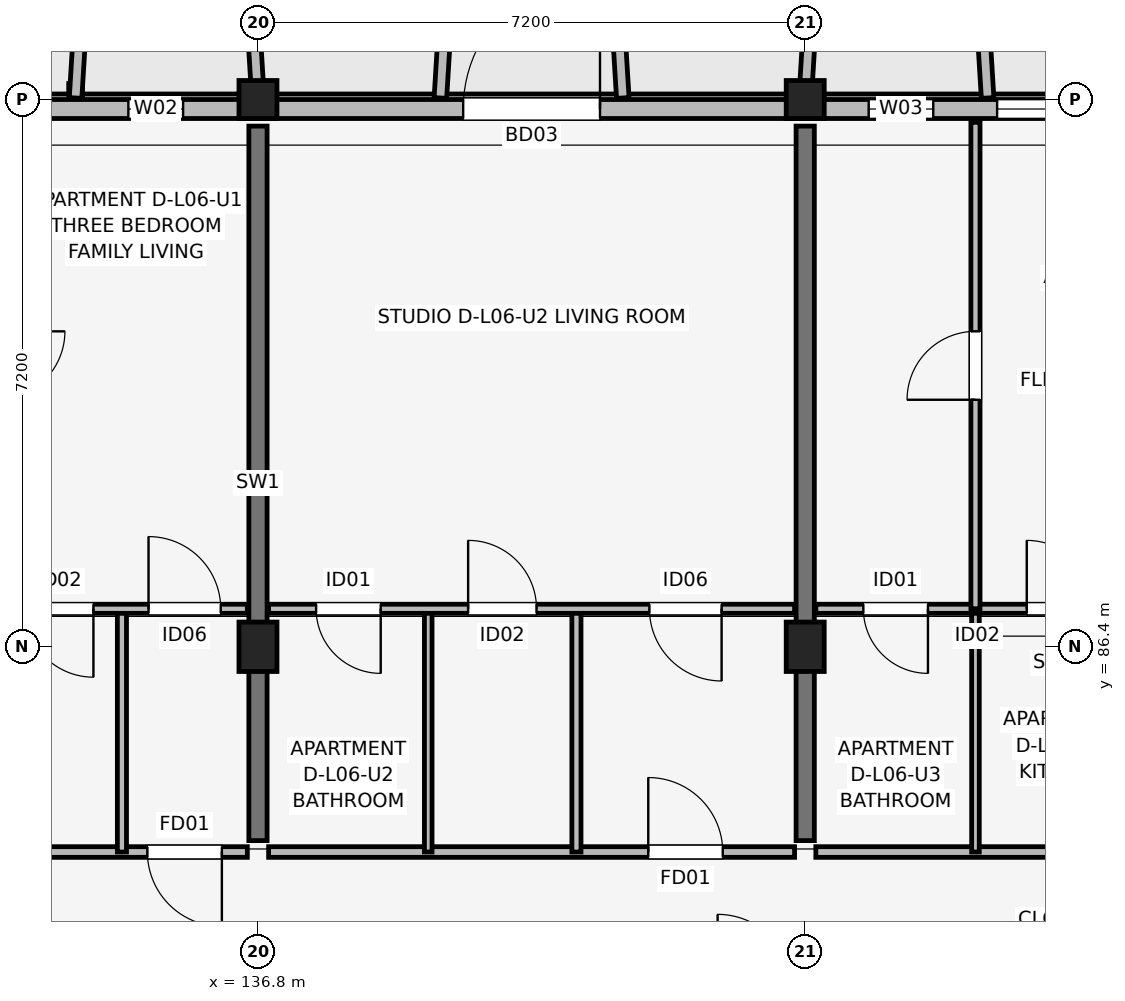
"""IFC4 building model, lengths in metres.
Left out: names, types, materials, properties, quantities, classifications, styles, units other than length and angle.
Written with IfcOpenShell. Run it as: python <this file> out.ifc"""

import sys

from ifc_helpers import new_model, si_unit, direction, frame, frame_2d, origin, origin_2d, place, context, subcontext, project, spatial, rectangle, extrude, element, fill, save


model = new_model("IFC4")
c1 = context("Model", 3, precision=1e-05, world=origin(), true_north=direction((0.0, 1.0)))
c2 = subcontext(c1, "Body", "Model", "MODEL_VIEW")
j1 = project(units=[si_unit("LENGTHUNIT", "METRE"), si_unit("PLANEANGLEUNIT", "RADIAN")], contexts=[c1])
p1 = place(None, origin())
s1 = spatial("IfcSite", under=j1, at=p1, CompositionType="ELEMENT")
p2 = place(p1, origin())
s2 = spatial("IfcBuilding", under=s1, at=p2, CompositionType="ELEMENT")
p3 = place(p2, frame((0.0, 0.0, 21.3)))
s3 = spatial("IfcBuildingStorey", under=s2, at=p3, CompositionType="ELEMENT", Elevation=21.3)
p4 = place(p3, frame((136.8, 86.4, 0.0), z_axis=(0.0, 0.0, 1.0), x_axis=(1.0, 0.0, 0.0)))
e1 = element("IfcColumn", 1, at=p4, inside=s3, PredefinedType="COLUMN", context=c2, shape_type="SweptSolid", body=[
    extrude(rectangle(XDim=0.5, YDim=0.65, at=origin_2d()), origin(), (0.0, 0.0, 1.0), 3.15),
])
p5 = place(p3, frame((136.8, 93.6, 0.0), z_axis=(0.0, 0.0, 1.0), x_axis=(1.0, 0.0, 0.0)))
e2 = element("IfcColumn", 2, at=p5, inside=s3, PredefinedType="COLUMN", context=c2, shape_type="SweptSolid", body=[
    extrude(rectangle(XDim=0.5, YDim=0.5, at=origin_2d()), origin(), (0.0, 0.0, 1.0), 3.15),
])
p6 = place(p3, frame((144.0, 86.4, 0.0), z_axis=(0.0, 0.0, 1.0), x_axis=(1.0, 0.0, 0.0)))
e3 = element("IfcColumn", 3, at=p6, inside=s3, PredefinedType="COLUMN", context=c2, shape_type="SweptSolid", body=[
    extrude(rectangle(XDim=0.5, YDim=0.65, at=origin_2d()), origin(), (0.0, 0.0, 1.0), 3.15),
])
p7 = place(p3, frame((144.0, 93.6, 0.0), z_axis=(0.0, 0.0, 1.0), x_axis=(1.0, 0.0, 0.0)))
e4 = element("IfcColumn", 4, at=p7, inside=s3, PredefinedType="COLUMN", context=c2, shape_type="SweptSolid", body=[
    extrude(rectangle(XDim=0.5, YDim=0.5, at=origin_2d()), origin(), (0.0, 0.0, 1.0), 3.15),
])
for number, where, z_axis, x_axis in (
    (5, (136.8, 83.85, 0.0), (0.0, 0.0, 1.0), (0.0, 1.0, 0.0)),
    (6, (144.0, 83.85, 0.0), (0.0, 0.0, 1.0), (0.0, 1.0, 0.0)),
):
    element("IfcWall", number, at=place(p3, frame(where, z_axis=z_axis, x_axis=x_axis)), inside=s3, PredefinedType="SHEAR", context=c2, shape_type="SweptSolid", body=[
        extrude(rectangle(XDim=9.4, YDim=0.24, at=frame_2d((4.7, 0.0))), origin(), (0.0, 0.0, 1.0), 3.15),
    ])
p8 = place(p3, frame((162.8, 93.475, 0.0), z_axis=(0.0, 0.0, 1.0), x_axis=(-1.0, 0.0, 0.0)))
e7 = element("IfcWall", 7, at=p8, inside=s3, PredefinedType="SOLIDWALL", context=c2, shape_type="SweptSolid", body=[
    extrude(rectangle(XDim=30.4, YDim=0.25, at=frame_2d((15.2, 0.0))), origin(), (0.0, 0.0, 1.0), 2.43),
])
p9 = place(p8, frame((23.3, 0.0, 0.0), z_axis=(0.0, 0.0, 1.0), x_axis=(-1.0, 0.0, 0.0)))
e8 = element("IfcOpeningElement", 8, at=p9, cuts=e7, PredefinedType="OPENING", context=c2, shape_type="SweptSolid", body=[
    extrude(rectangle(XDim=1.8, YDim=2.15, at=frame_2d((0.9, 1.075))), frame((0.0, 0.135, 0.0), z_axis=(0.0, -1.0, 0.0), x_axis=(1.0, 0.0, 0.0)), (0.0, 0.0, 1.0), 0.27),
])
p10 = place(p8, frame((8.825, 0.0, 0.0), z_axis=(0.0, 0.0, 1.0), x_axis=(-1.0, 0.0, 0.0)))
e9 = element("IfcOpeningElement", 9, at=p10, cuts=e7, PredefinedType="OPENING", context=c2, shape_type="SweptSolid", body=[
    extrude(rectangle(XDim=1.65, YDim=2.15, at=frame_2d((0.825, 1.075))), frame((0.0, 0.135, 0.0), z_axis=(0.0, -1.0, 0.0), x_axis=(1.0, 0.0, 0.0)), (0.0, 0.0, 1.0), 0.27),
])
p11 = place(p8, frame((26.985, 0.0, 0.75)))
e10 = element("IfcOpeningElement", 10, at=p11, cuts=e7, PredefinedType="OPENING", context=c2, shape_type="SweptSolid", body=[
    extrude(rectangle(XDim=0.72, YDim=1.35, at=frame_2d((0.36, 0.675))), frame((0.0, 0.135, 0.0), z_axis=(0.0, -1.0, 0.0), x_axis=(1.0, 0.0, 0.0)), (0.0, 0.0, 1.0), 0.27),
])
p12 = place(p8, frame((17.115, 0.0, 0.75)))
e11 = element("IfcOpeningElement", 11, at=p12, cuts=e7, PredefinedType="OPENING", context=c2, shape_type="SweptSolid", body=[
    extrude(rectangle(XDim=0.85, YDim=1.4, at=frame_2d((0.425, 0.7))), frame((0.0, 0.135, 0.0), z_axis=(0.0, -1.0, 0.0), x_axis=(1.0, 0.0, 0.0)), (0.0, 0.0, 1.0), 0.27),
])
p13 = place(p8, frame((14.125, 0.0, 0.67)))
e12 = element("IfcOpeningElement", 12, at=p13, cuts=e7, PredefinedType="OPENING", context=c2, shape_type="SweptSolid", body=[
    extrude(rectangle(XDim=2.15, YDim=1.65, at=frame_2d((1.075, 0.825))), frame((0.0, 0.135, 0.0), z_axis=(0.0, -1.0, 0.0), x_axis=(1.0, 0.0, 0.0)), (0.0, 0.0, 1.0), 0.27),
])
p14 = place(p8, frame((2.125, 0.0, 0.7)))
e13 = element("IfcOpeningElement", 13, at=p14, cuts=e7, PredefinedType="OPENING", context=c2, shape_type="SweptSolid", body=[
    extrude(rectangle(XDim=1.86, YDim=1.6, at=frame_2d((0.93, 0.8))), frame((0.0, 0.135, 0.0), z_axis=(0.0, -1.0, 0.0), x_axis=(1.0, 0.0, 0.0)), (0.0, 0.0, 1.0), 0.27),
])
for number, where, z_axis, x_axis in (
    (14, (134.4, 93.62, 0.0), (0.0, 0.0, 1.0), (0.061, 0.998, 0.0)),
    (15, (136.8, 93.62, 0.0), (0.0, 0.0, 1.0), (-0.061, 0.998, 0.0)),
):
    element("IfcWall", number, at=place(p3, frame(where, z_axis=z_axis, x_axis=x_axis)), inside=s3, PredefinedType="ELEMENTEDWALL", context=c2, shape_type="SweptSolid", body=[
        extrude(rectangle(XDim=1.964, YDim=0.165, at=frame_2d((0.982, 0.0))), origin(), (0.0, 0.0, 1.0), 2.95),
    ])
for number, where, z_axis, x_axis in (
    (16, (139.2, 93.62, 0.0), (0.0, 0.0, 1.0), (0.061, 0.998, 0.0)),
    (17, (141.6, 93.62, 0.0), (0.0, 0.0, 1.0), (-0.061, 0.998, 0.0)),
):
    element("IfcWall", number, at=place(p3, frame(where, z_axis=z_axis, x_axis=x_axis)), inside=s3, PredefinedType="ELEMENTEDWALL", context=c2, shape_type="SweptSolid", body=[
        extrude(rectangle(XDim=1.964, YDim=0.165, at=frame_2d((0.982, 0.0))), origin(), (0.0, 0.0, 1.0), 2.58),
    ])
p15 = place(p3, frame((144.0, 93.62, 0.0), z_axis=(0.0, 0.0, 1.0), x_axis=(0.061170732449, 0.998127317276, 0.0)))
e18 = element("IfcWall", 18, at=p15, inside=s3, PredefinedType="ELEMENTEDWALL", context=c2, shape_type="SweptSolid", body=[
    extrude(rectangle(XDim=1.964, YDim=0.165, at=frame_2d((0.982, 0.0))), origin(), (0.0, 0.0, 1.0), 2.95),
])
p16 = place(p3, frame((146.4, 93.62, 0.0), z_axis=(0.0, 0.0, 1.0), x_axis=(-0.061046865508, 0.998134900808, 0.0)))
e19 = element("IfcWall", 19, at=p16, inside=s3, PredefinedType="ELEMENTEDWALL", context=c2, shape_type="SweptSolid", body=[
    extrude(rectangle(XDim=1.964, YDim=0.165, at=frame_2d((0.982, 0.0))), origin(), (0.0, 0.0, 1.0), 2.53),
])
p17 = place(p3, frame((129.74, 83.7, 0.0), z_axis=(0.0, 0.0, 1.0), x_axis=(1.0, 0.0, 0.0)))
e20 = element("IfcWall", 20, at=p17, inside=s3, PredefinedType="PARTITIONING", context=c2, shape_type="SweptSolid", body=[
    extrude(rectangle(XDim=6.92, YDim=0.14, at=frame_2d((3.46, 0.0))), origin(), (0.0, 0.0, 1.0), 2.38),
])
p18 = place(p17, frame((6.585, 0.0, 0.0), z_axis=(0.0, 0.0, 1.0), x_axis=(-1.0, 0.0, 0.0)))
e21 = element("IfcOpeningElement", 21, at=p18, cuts=e20, PredefinedType="OPENING", context=c2, shape_type="SweptSolid", body=[
    extrude(rectangle(XDim=0.98, YDim=2.1, at=frame_2d((0.49, 1.05))), frame((0.0, 0.08, 0.0), z_axis=(0.0, -1.0, 0.0), x_axis=(1.0, 0.0, 0.0)), (0.0, 0.0, 1.0), 0.16),
])
p19 = place(p3, frame((135.01, 83.7, 0.0), z_axis=(0.0, 0.0, 1.0), x_axis=(0.0, 1.0, 0.0)))
e22 = element("IfcWall", 22, at=p19, inside=s3, PredefinedType="PARTITIONING", context=c2, shape_type="SweptSolid", body=[
    extrude(rectangle(XDim=3.2, YDim=0.12, at=frame_2d((1.6, 0.0))), origin(), (0.0, 0.0, 1.0), 2.38),
])
p20 = place(p3, frame((129.74, 86.9, 0.0), z_axis=(0.0, 0.0, 1.0), x_axis=(1.0, 0.0, 0.0)))
e23 = element("IfcWall", 23, at=p20, inside=s3, PredefinedType="PARTITIONING", context=c2, shape_type="SweptSolid", body=[
    extrude(rectangle(XDim=6.92, YDim=0.12, at=frame_2d((3.46, 0.0))), origin(), (0.0, 0.0, 1.0), 2.38),
])
p21 = place(p20, frame((2.24, 0.0, 0.0)))
e24 = element("IfcOpeningElement", 24, at=p21, cuts=e23, PredefinedType="OPENING", context=c2, shape_type="SweptSolid", body=[
    extrude(rectangle(XDim=0.85, YDim=2.08, at=frame_2d((0.425, 1.04))), frame((0.0, 0.07, 0.0), z_axis=(0.0, -1.0, 0.0), x_axis=(1.0, 0.0, 0.0)), (0.0, 0.0, 1.0), 0.14),
])
p22 = place(p20, frame((4.895, 0.0, 0.0), z_axis=(0.0, 0.0, 1.0), x_axis=(-1.0, 0.0, 0.0)))
e25 = element("IfcOpeningElement", 25, at=p22, cuts=e23, PredefinedType="OPENING", context=c2, shape_type="SweptSolid", body=[
    extrude(rectangle(XDim=0.9, YDim=2.08, at=frame_2d((0.45, 1.04))), frame((0.0, 0.07, 0.0), z_axis=(0.0, -1.0, 0.0), x_axis=(1.0, 0.0, 0.0)), (0.0, 0.0, 1.0), 0.14),
])
p23 = place(p20, frame((5.62, 0.0, 0.0)))
e26 = element("IfcOpeningElement", 26, at=p23, cuts=e23, PredefinedType="OPENING", context=c2, shape_type="SweptSolid", body=[
    extrude(rectangle(XDim=0.95, YDim=2.08, at=frame_2d((0.475, 1.04))), frame((0.0, 0.07, 0.0), z_axis=(0.0, -1.0, 0.0), x_axis=(1.0, 0.0, 0.0)), (0.0, 0.0, 1.0), 0.14),
])
p24 = place(p3, frame((136.94, 83.7, 0.0), z_axis=(0.0, 0.0, 1.0), x_axis=(1.0, 0.0, 0.0)))
e27 = element("IfcWall", 27, at=p24, inside=s3, PredefinedType="PARTITIONING", context=c2, shape_type="SweptSolid", body=[
    extrude(rectangle(XDim=6.92, YDim=0.14, at=frame_2d((3.46, 0.0))), origin(), (0.0, 0.0, 1.0), 2.38),
])
p25 = place(p24, frame((4.995, 0.0, 0.0)))
e28 = element("IfcOpeningElement", 28, at=p25, cuts=e27, PredefinedType="OPENING", context=c2, shape_type="SweptSolid", body=[
    extrude(rectangle(XDim=0.98, YDim=2.1, at=frame_2d((0.49, 1.05))), frame((0.0, 0.08, 0.0), z_axis=(0.0, -1.0, 0.0), x_axis=(1.0, 0.0, 0.0)), (0.0, 0.0, 1.0), 0.16),
])
p26 = place(p3, frame((139.04, 83.7, 0.0), z_axis=(0.0, 0.0, 1.0), x_axis=(0.0, 1.0, 0.0)))
e29 = element("IfcWall", 29, at=p26, inside=s3, PredefinedType="PARTITIONING", context=c2, shape_type="SweptSolid", body=[
    extrude(rectangle(XDim=3.2, YDim=0.1, at=frame_2d((1.6, 0.0))), origin(), (0.0, 0.0, 1.0), 2.38),
])
p27 = place(p3, frame((140.99, 83.7, 0.0), z_axis=(0.0, 0.0, 1.0), x_axis=(0.0, 1.0, 0.0)))
e30 = element("IfcWall", 30, at=p27, inside=s3, PredefinedType="PARTITIONING", context=c2, shape_type="SweptSolid", body=[
    extrude(rectangle(XDim=3.2, YDim=0.12, at=frame_2d((1.6, 0.0))), origin(), (0.0, 0.0, 1.0), 2.38),
])
p28 = place(p3, frame((136.94, 86.9, 0.0), z_axis=(0.0, 0.0, 1.0), x_axis=(1.0, 0.0, 0.0)))
e31 = element("IfcWall", 31, at=p28, inside=s3, PredefinedType="PARTITIONING", context=c2, shape_type="SweptSolid", body=[
    extrude(rectangle(XDim=6.92, YDim=0.12, at=frame_2d((3.46, 0.0))), origin(), (0.0, 0.0, 1.0), 2.38),
])
p29 = place(p28, frame((1.475, 0.0, 0.0), z_axis=(0.0, 0.0, 1.0), x_axis=(-1.0, 0.0, 0.0)))
e32 = element("IfcOpeningElement", 32, at=p29, cuts=e31, PredefinedType="OPENING", context=c2, shape_type="SweptSolid", body=[
    extrude(rectangle(XDim=0.85, YDim=2.08, at=frame_2d((0.425, 1.04))), frame((0.0, 0.07, 0.0), z_axis=(0.0, -1.0, 0.0), x_axis=(1.0, 0.0, 0.0)), (0.0, 0.0, 1.0), 0.14),
])
p30 = place(p28, frame((2.625, 0.0, 0.0)))
e33 = element("IfcOpeningElement", 33, at=p30, cuts=e31, PredefinedType="OPENING", context=c2, shape_type="SweptSolid", body=[
    extrude(rectangle(XDim=0.9, YDim=2.08, at=frame_2d((0.45, 1.04))), frame((0.0, 0.07, 0.0), z_axis=(0.0, -1.0, 0.0), x_axis=(1.0, 0.0, 0.0)), (0.0, 0.0, 1.0), 0.14),
])
p31 = place(p28, frame((5.96, 0.0, 0.0), z_axis=(0.0, 0.0, 1.0), x_axis=(-1.0, 0.0, 0.0)))
e34 = element("IfcOpeningElement", 34, at=p31, cuts=e31, PredefinedType="OPENING", context=c2, shape_type="SweptSolid", body=[
    extrude(rectangle(XDim=0.95, YDim=2.08, at=frame_2d((0.475, 1.04))), frame((0.0, 0.07, 0.0), z_axis=(0.0, -1.0, 0.0), x_axis=(1.0, 0.0, 0.0)), (0.0, 0.0, 1.0), 0.14),
])
p32 = place(p3, frame((144.14, 83.7, 0.0), z_axis=(0.0, 0.0, 1.0), x_axis=(1.0, 0.0, 0.0)))
e35 = element("IfcWall", 35, at=p32, inside=s3, PredefinedType="PARTITIONING", context=c2, shape_type="SweptSolid", body=[
    extrude(rectangle(XDim=6.92, YDim=0.14, at=frame_2d((3.46, 0.0))), origin(), (0.0, 0.0, 1.0), 2.38),
])
p33 = place(p32, frame((5.145, 0.0, 0.0)))
e36 = element("IfcOpeningElement", 36, at=p33, cuts=e35, PredefinedType="OPENING", context=c2, shape_type="SweptSolid", body=[
    extrude(rectangle(XDim=0.98, YDim=2.1, at=frame_2d((0.49, 1.05))), frame((0.0, 0.08, 0.0), z_axis=(0.0, -1.0, 0.0), x_axis=(1.0, 0.0, 0.0)), (0.0, 0.0, 1.0), 0.16),
])
p34 = place(p3, frame((146.24, 83.7, 0.0), z_axis=(0.0, 0.0, 1.0), x_axis=(0.0, 1.0, 0.0)))
e37 = element("IfcWall", 37, at=p34, inside=s3, PredefinedType="PARTITIONING", context=c2, shape_type="SweptSolid", body=[
    extrude(rectangle(XDim=3.2, YDim=0.1, at=frame_2d((1.6, 0.0))), origin(), (0.0, 0.0, 1.0), 2.38),
])
p35 = place(p3, frame((144.14, 86.9, 0.0), z_axis=(0.0, 0.0, 1.0), x_axis=(1.0, 0.0, 0.0)))
e38 = element("IfcWall", 38, at=p35, inside=s3, PredefinedType="PARTITIONING", context=c2, shape_type="SweptSolid", body=[
    extrude(rectangle(XDim=6.92, YDim=0.12, at=frame_2d((3.46, 0.0))), origin(), (0.0, 0.0, 1.0), 2.38),
])
p36 = place(p35, frame((1.475, 0.0, 0.0), z_axis=(0.0, 0.0, 1.0), x_axis=(-1.0, 0.0, 0.0)))
e39 = element("IfcOpeningElement", 39, at=p36, cuts=e38, PredefinedType="OPENING", context=c2, shape_type="SweptSolid", body=[
    extrude(rectangle(XDim=0.85, YDim=2.08, at=frame_2d((0.425, 1.04))), frame((0.0, 0.07, 0.0), z_axis=(0.0, -1.0, 0.0), x_axis=(1.0, 0.0, 0.0)), (0.0, 0.0, 1.0), 0.14),
])
p37 = place(p35, frame((2.775, 0.0, 0.0)))
e40 = element("IfcOpeningElement", 40, at=p37, cuts=e38, PredefinedType="OPENING", context=c2, shape_type="SweptSolid", body=[
    extrude(rectangle(XDim=0.9, YDim=2.08, at=frame_2d((0.45, 1.04))), frame((0.0, 0.07, 0.0), z_axis=(0.0, -1.0, 0.0), x_axis=(1.0, 0.0, 0.0)), (0.0, 0.0, 1.0), 0.14),
])
p38 = place(p35, frame((6.11, 0.0, 0.0), z_axis=(0.0, 0.0, 1.0), x_axis=(-1.0, 0.0, 0.0)))
e41 = element("IfcOpeningElement", 41, at=p38, cuts=e38, PredefinedType="OPENING", context=c2, shape_type="SweptSolid", body=[
    extrude(rectangle(XDim=0.95, YDim=2.08, at=frame_2d((0.475, 1.04))), frame((0.0, 0.07, 0.0), z_axis=(0.0, -1.0, 0.0), x_axis=(1.0, 0.0, 0.0)), (0.0, 0.0, 1.0), 0.14),
])
p39 = place(p3, frame((146.24, 86.9, 0.0), z_axis=(0.0, 0.0, 1.0), x_axis=(0.0, 1.0, 0.0)))
e42 = element("IfcWall", 42, at=p39, inside=s3, PredefinedType="PARTITIONING", context=c2, shape_type="SweptSolid", body=[
    extrude(rectangle(XDim=6.4, YDim=0.12, at=frame_2d((3.2, 0.0))), origin(), (0.0, 0.0, 1.0), 2.38),
])
p40 = place(p39, frame((2.75, 0.0, 0.0)))
e43 = element("IfcOpeningElement", 43, at=p40, cuts=e42, PredefinedType="OPENING", context=c2, shape_type="SweptSolid", body=[
    extrude(rectangle(XDim=0.9, YDim=2.08, at=frame_2d((0.45, 1.04))), frame((0.0, 0.07, 0.0), z_axis=(0.0, -1.0, 0.0), x_axis=(1.0, 0.0, 0.0)), (0.0, 0.0, 1.0), 0.14),
])
p41 = place(p9, origin())
e44 = element("IfcDoor", 44, at=p41, inside=s3, OperationType="SINGLE_SWING_LEFT", PredefinedType="DOOR", context=c2, shape_type="SweptSolid", body=[
    extrude(rectangle(XDim=1.8, YDim=2.15, at=frame_2d((0.9, 1.075))), frame((0.0, 0.025, 0.0), z_axis=(0.0, -1.0, 0.0), x_axis=(1.0, 0.0, 0.0)), (0.0, 0.0, 1.0), 0.05),
])
fill(e8, e44)
p42 = place(p11, origin())
e45 = element("IfcWindow", 45, at=p42, inside=s3, PartitioningType="SINGLE_PANEL", PredefinedType="WINDOW", context=c2, shape_type="SweptSolid", body=[
    extrude(rectangle(XDim=0.72, YDim=1.35, at=frame_2d((0.36, 0.675))), frame((0.0, 0.03, 0.0), z_axis=(0.0, -1.0, 0.0), x_axis=(1.0, 0.0, 0.0)), (0.0, 0.0, 1.0), 0.06),
])
fill(e10, e45)
p43 = place(p12, origin())
e46 = element("IfcWindow", 46, at=p43, inside=s3, PartitioningType="SINGLE_PANEL", PredefinedType="WINDOW", context=c2, shape_type="SweptSolid", body=[
    extrude(rectangle(XDim=0.85, YDim=1.4, at=frame_2d((0.425, 0.7))), frame((0.0, 0.03, 0.0), z_axis=(0.0, -1.0, 0.0), x_axis=(1.0, 0.0, 0.0)), (0.0, 0.0, 1.0), 0.06),
])
fill(e11, e46)
p44 = place(p13, origin())
e47 = element("IfcWindow", 47, at=p44, inside=s3, PartitioningType="SINGLE_PANEL", PredefinedType="WINDOW", context=c2, shape_type="SweptSolid", body=[
    extrude(rectangle(XDim=2.15, YDim=1.65, at=frame_2d((1.075, 0.825))), frame((0.0, 0.03, 0.0), z_axis=(0.0, -1.0, 0.0), x_axis=(1.0, 0.0, 0.0)), (0.0, 0.0, 1.0), 0.06),
])
fill(e12, e47)
p45 = place(p18, origin())
e48 = element("IfcDoor", 48, at=p45, inside=s3, OperationType="SINGLE_SWING_RIGHT", PredefinedType="DOOR", context=c2, shape_type="SweptSolid", body=[
    extrude(rectangle(XDim=0.98, YDim=2.1, at=frame_2d((0.49, 1.05))), frame((0.0, 0.025, 0.0), z_axis=(0.0, -1.0, 0.0), x_axis=(1.0, 0.0, 0.0)), (0.0, 0.0, 1.0), 0.05),
])
fill(e21, e48)
p46 = place(p22, origin())
e49 = element("IfcDoor", 49, at=p46, inside=s3, OperationType="SINGLE_SWING_RIGHT", PredefinedType="DOOR", context=c2, shape_type="SweptSolid", body=[
    extrude(rectangle(XDim=0.9, YDim=2.08, at=frame_2d((0.45, 1.04))), frame((0.0, 0.025, 0.0), z_axis=(0.0, -1.0, 0.0), x_axis=(1.0, 0.0, 0.0)), (0.0, 0.0, 1.0), 0.05),
])
fill(e25, e49)
p47 = place(p23, origin())
e50 = element("IfcDoor", 50, at=p47, inside=s3, OperationType="SINGLE_SWING_LEFT", PredefinedType="DOOR", context=c2, shape_type="SweptSolid", body=[
    extrude(rectangle(XDim=0.95, YDim=2.08, at=frame_2d((0.475, 1.04))), frame((0.0, 0.025, 0.0), z_axis=(0.0, -1.0, 0.0), x_axis=(1.0, 0.0, 0.0)), (0.0, 0.0, 1.0), 0.05),
])
fill(e26, e50)
p48 = place(p25, origin())
e51 = element("IfcDoor", 51, at=p48, inside=s3, OperationType="SINGLE_SWING_LEFT", PredefinedType="DOOR", context=c2, shape_type="SweptSolid", body=[
    extrude(rectangle(XDim=0.98, YDim=2.1, at=frame_2d((0.49, 1.05))), frame((0.0, 0.025, 0.0), z_axis=(0.0, -1.0, 0.0), x_axis=(1.0, 0.0, 0.0)), (0.0, 0.0, 1.0), 0.05),
])
fill(e28, e51)
p49 = place(p29, origin())
e52 = element("IfcDoor", 52, at=p49, inside=s3, OperationType="SINGLE_SWING_RIGHT", PredefinedType="DOOR", context=c2, shape_type="SweptSolid", body=[
    extrude(rectangle(XDim=0.85, YDim=2.08, at=frame_2d((0.425, 1.04))), frame((0.0, 0.025, 0.0), z_axis=(0.0, -1.0, 0.0), x_axis=(1.0, 0.0, 0.0)), (0.0, 0.0, 1.0), 0.05),
])
fill(e32, e52)
p50 = place(p30, origin())
e53 = element("IfcDoor", 53, at=p50, inside=s3, OperationType="SINGLE_SWING_LEFT", PredefinedType="DOOR", context=c2, shape_type="SweptSolid", body=[
    extrude(rectangle(XDim=0.9, YDim=2.08, at=frame_2d((0.45, 1.04))), frame((0.0, 0.025, 0.0), z_axis=(0.0, -1.0, 0.0), x_axis=(1.0, 0.0, 0.0)), (0.0, 0.0, 1.0), 0.05),
])
fill(e33, e53)
p51 = place(p31, origin())
e54 = element("IfcDoor", 54, at=p51, inside=s3, OperationType="SINGLE_SWING_RIGHT", PredefinedType="DOOR", context=c2, shape_type="SweptSolid", body=[
    extrude(rectangle(XDim=0.95, YDim=2.08, at=frame_2d((0.475, 1.04))), frame((0.0, 0.025, 0.0), z_axis=(0.0, -1.0, 0.0), x_axis=(1.0, 0.0, 0.0)), (0.0, 0.0, 1.0), 0.05),
])
fill(e34, e54)
p52 = place(p36, origin())
e55 = element("IfcDoor", 55, at=p52, inside=s3, OperationType="SINGLE_SWING_RIGHT", PredefinedType="DOOR", context=c2, shape_type="SweptSolid", body=[
    extrude(rectangle(XDim=0.85, YDim=2.08, at=frame_2d((0.425, 1.04))), frame((0.0, 0.025, 0.0), z_axis=(0.0, -1.0, 0.0), x_axis=(1.0, 0.0, 0.0)), (0.0, 0.0, 1.0), 0.05),
])
fill(e39, e55)
p53 = place(p37, origin())
e56 = element("IfcDoor", 56, at=p53, inside=s3, OperationType="SINGLE_SWING_LEFT", PredefinedType="DOOR", context=c2, shape_type="SweptSolid", body=[
    extrude(rectangle(XDim=0.9, YDim=2.08, at=frame_2d((0.45, 1.04))), frame((0.0, 0.025, 0.0), z_axis=(0.0, -1.0, 0.0), x_axis=(1.0, 0.0, 0.0)), (0.0, 0.0, 1.0), 0.05),
])
fill(e40, e56)
p54 = place(p40, origin())
e57 = element("IfcDoor", 57, at=p54, inside=s3, OperationType="SINGLE_SWING_LEFT", PredefinedType="DOOR", context=c2, shape_type="SweptSolid", body=[
    extrude(rectangle(XDim=0.9, YDim=2.08, at=frame_2d((0.45, 1.04))), frame((0.0, 0.025, 0.0), z_axis=(0.0, -1.0, 0.0), x_axis=(1.0, 0.0, 0.0)), (0.0, 0.0, 1.0), 0.05),
])
fill(e43, e57)
save(model, sys.argv[1])
